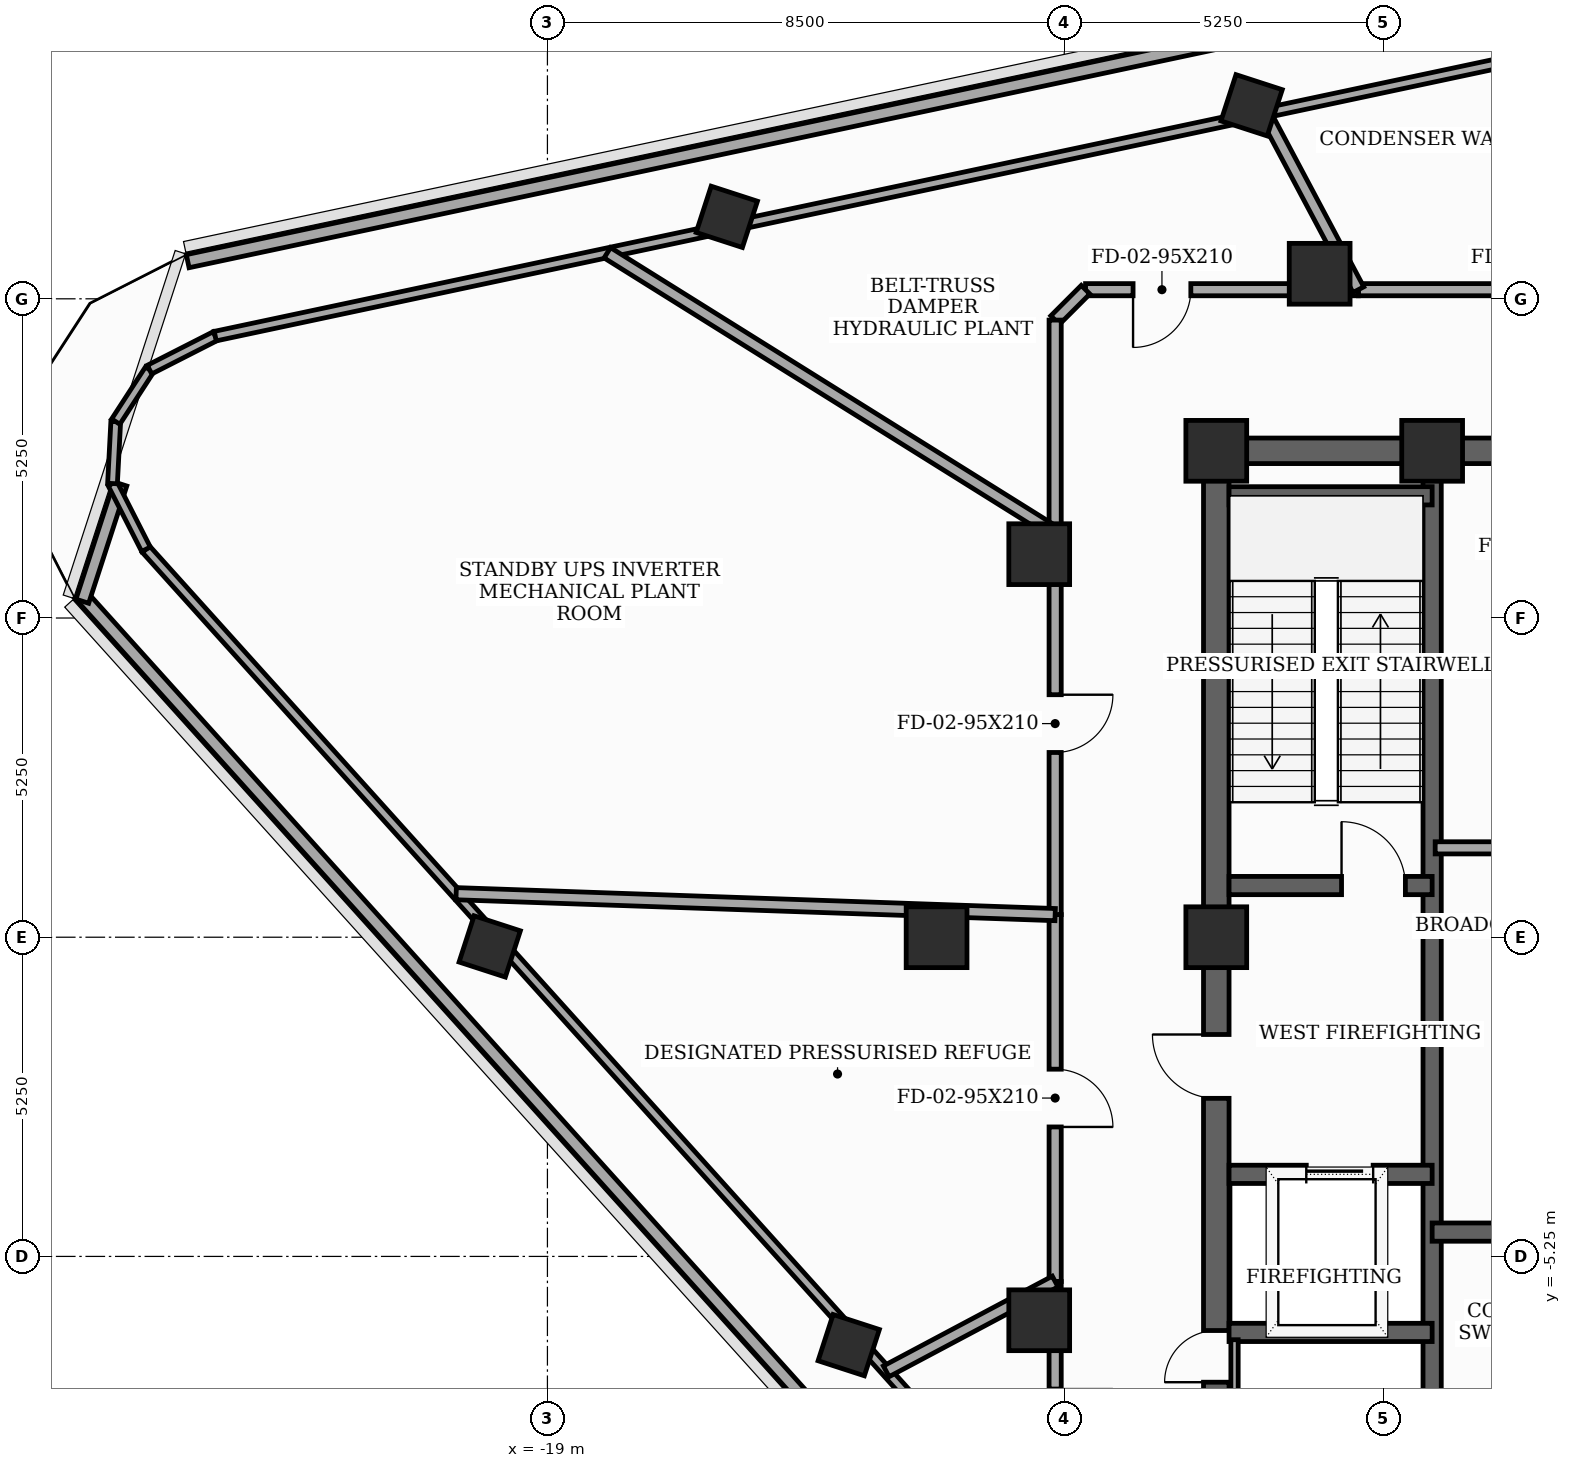
"""IFC4 building model, lengths in metres.
Left out: names, types, materials, properties, quantities, classifications, styles, units other than length and angle.
Written with IfcOpenShell. Run it as: python <this file> out.ifc"""

import sys

from ifc_helpers import new_model, si_unit, direction, frame, frame_2d, origin, origin_2d, place, context, subcontext, project, spatial, rectangle, extrude, element, fill, save


model = new_model("IFC4")
c1 = context("Model", 3, precision=1e-05, world=origin(), true_north=direction((0.0, 1.0)))
c2 = subcontext(c1, "Body", "Model", "MODEL_VIEW")
j1 = project(units=[si_unit("LENGTHUNIT", "METRE"), si_unit("PLANEANGLEUNIT", "RADIAN")], contexts=[c1])
p1 = place(None, origin())
s1 = spatial("IfcSite", under=j1, at=p1, CompositionType="ELEMENT")
p2 = place(p1, origin())
s2 = spatial("IfcBuilding", under=s1, at=p2, CompositionType="ELEMENT")
p3 = place(p2, frame((0.0, 0.0, 278.1)))
s3 = spatial("IfcBuildingStorey", under=s2, at=p3, CompositionType="ELEMENT", Elevation=278.1)
for number, where, z_axis, x_axis in (
    (1, (-4.45, 8.0, 0.0), (0.0, 0.0, 1.0), (1.0, 0.0, 0.0)),
    (2, (-8.0, 8.0, 0.0), (0.0, 0.0, 1.0), (1.0, 0.0, 0.0)),
    (3, (-8.0, 0.0, 0.0), (0.0, 0.0, 1.0), (1.0, 0.0, 0.0)),
    (4, (-6.3, 10.912, 0.0), (0.0, 0.0, 1.0), (1.0, 0.0, 0.0)),
    (5, (-10.912, 6.3, 0.0), (0.0, 0.0, 1.0), (1.0, 0.0, 0.0)),
    (6, (-12.6, 0.0, 0.0), (0.0, 0.0, 1.0), (1.0, 0.0, 0.0)),
    (7, (-10.912, -6.3, 0.0), (0.0, 0.0, 1.0), (1.0, 0.0, 0.0)),
):
    element("IfcColumn", number, at=place(p3, frame(where, z_axis=z_axis, x_axis=x_axis)), inside=s3, PredefinedType="COLUMN", context=c2, shape_type="SweptSolid", body=[
        extrude(rectangle(XDim=1.0, YDim=1.0, at=origin_2d()), origin(), (0.0, 0.0, 1.0), 5.1),
    ])
for number, where, z_axis, x_axis in (
    (8, (-7.419, 13.683, 0.0), (0.0, 0.0, 1.0), (0.309, 0.951, 0.0)),
    (9, (-16.05, 11.848, 0.0), (0.0, 0.0, 1.0), (0.309, 0.951, 0.0)),
    (10, (-19.949, -0.151, 0.0), (0.0, 0.0, 1.0), (0.309, 0.951, 0.0)),
    (11, (-14.045, -6.709, 0.0), (0.0, 0.0, 1.0), (0.309, 0.951, 0.0)),
):
    element("IfcColumn", number, at=place(p3, frame(where, z_axis=z_axis, x_axis=x_axis)), inside=s3, PredefinedType="COLUMN", context=c2, shape_type="SweptSolid", body=[
        extrude(rectangle(XDim=0.8, YDim=0.8, at=origin_2d()), origin(), (0.0, 0.0, 1.0), 5.1),
    ])
p4 = place(p3, frame((18.24, 20.292, 0.0), z_axis=(0.0, 0.0, 1.0), x_axis=(-0.978147584683, -0.207911766332, 0.0)))
e12 = element("IfcWall", 12, at=p4, inside=s3, PredefinedType="SOLIDWALL", context=c2, shape_type="SweptSolid", body=[
    extrude(rectangle(XDim=44.12, YDim=0.22, at=frame_2d((22.06, 0.0))), origin(), (0.0, 0.0, 1.0), 4.4),
])
p5 = place(p3, frame((-26.693, 5.65, 0.0), z_axis=(0.0, 0.0, 1.0), x_axis=(0.669131945078, -0.743143620087, 0.0)))
e13 = element("IfcWall", 13, at=p5, inside=s3, PredefinedType="SOLIDWALL", context=c2, shape_type="SweptSolid", body=[
    extrude(rectangle(XDim=44.12, YDim=0.22, at=frame_2d((22.06, 0.0))), origin(), (0.0, 0.0, 1.0), 4.4),
])
p6 = place(p3, frame((-26.022, 7.455, 0.0), z_axis=(0.0, 0.0, 1.0), x_axis=(-0.309031629186, -0.951051761032, 0.0)))
e14 = element("IfcWall", 14, at=p6, inside=s3, PredefinedType="SOLIDWALL", context=c2, shape_type="SweptSolid", body=[
    extrude(rectangle(XDim=2.028, YDim=0.22, at=frame_2d((1.014, 0.0))), origin(), (0.0, 0.0, 1.0), 4.4),
])
p7 = place(p3, frame((-8.0, -8.0, 0.0), z_axis=(0.0, 0.0, 1.0), x_axis=(0.0, 1.0, 0.0)))
e15 = element("IfcWall", 15, at=p7, inside=s3, PredefinedType="SHEAR", context=c2, shape_type="SweptSolid", body=[
    extrude(rectangle(XDim=16.0, YDim=0.42, at=frame_2d((8.0, 0.0))), origin(), (0.0, 0.0, 1.0), 4.9),
])
p8 = place(p7, frame((0.681, 0.0, 0.0)))
e16 = element("IfcOpeningElement", 16, at=p8, cuts=e15, PredefinedType="OPENING", context=c2, shape_type="SweptSolid", body=[
    extrude(rectangle(XDim=0.85, YDim=2.02, at=frame_2d((0.425, 1.01))), frame((0.0, 0.22, 0.0), z_axis=(0.0, -1.0, 0.0), x_axis=(1.0, 0.0, 0.0)), (0.0, 0.0, 1.0), 0.44),
])
p9 = place(p7, frame((5.35, 0.0, 0.0)))
e17 = element("IfcOpeningElement", 17, at=p9, cuts=e15, PredefinedType="OPENING", context=c2, shape_type="SweptSolid", body=[
    extrude(rectangle(XDim=1.05, YDim=2.15, at=frame_2d((0.525, 1.075))), frame((0.0, 0.22, 0.0), z_axis=(0.0, -1.0, 0.0), x_axis=(1.0, 0.0, 0.0)), (0.0, 0.0, 1.0), 0.44),
])
p10 = place(p3, frame((-8.0, 8.0, 0.0), z_axis=(0.0, 0.0, 1.0), x_axis=(1.0, 0.0, 0.0)))
e18 = element("IfcWall", 18, at=p10, inside=s3, PredefinedType="SHEAR", context=c2, shape_type="SweptSolid", body=[
    extrude(rectangle(XDim=16.0, YDim=0.42, at=frame_2d((8.0, 0.0))), origin(), (0.0, 0.0, 1.0), 4.9),
])
p11 = place(p10, frame((7.1, 0.0, 0.0)))
e19 = element("IfcOpeningElement", 19, at=p11, cuts=e18, PredefinedType="OPENING", context=c2, shape_type="SweptSolid", body=[
    extrude(rectangle(XDim=1.8, YDim=2.15, at=frame_2d((0.9, 1.075))), frame((0.0, 0.22, 0.0), z_axis=(0.0, -1.0, 0.0), x_axis=(1.0, 0.0, 0.0)), (0.0, 0.0, 1.0), 0.44),
])
p12 = place(p3, frame((-4.45, -7.79, 0.0), z_axis=(0.0, 0.0, 1.0), x_axis=(0.0, 1.0, 0.0)))
e20 = element("IfcWall", 20, at=p12, inside=s3, PredefinedType="SHEAR", context=c2, shape_type="SweptSolid", body=[
    extrude(rectangle(XDim=15.58, YDim=0.3, at=frame_2d((7.79, 0.0))), origin(), (0.0, 0.0, 1.0), 4.9),
])
p13 = place(p3, frame((-7.79, 0.85, 0.0), z_axis=(0.0, 0.0, 1.0), x_axis=(1.0, 0.0, 0.0)))
e21 = element("IfcWall", 21, at=p13, inside=s3, PredefinedType="SHEAR", context=c2, shape_type="SweptSolid", body=[
    extrude(rectangle(XDim=3.34, YDim=0.3, at=frame_2d((1.67, 0.0))), origin(), (0.0, 0.0, 1.0), 4.9),
])
p14 = place(p13, frame((1.85, 0.0, 0.0)))
e22 = element("IfcOpeningElement", 22, at=p14, cuts=e21, PredefinedType="OPENING", context=c2, shape_type="SweptSolid", body=[
    extrude(rectangle(XDim=1.05, YDim=2.15, at=frame_2d((0.525, 1.075))), frame((0.0, 0.16, 0.0), z_axis=(0.0, -1.0, 0.0), x_axis=(1.0, 0.0, 0.0)), (0.0, 0.0, 1.0), 0.32),
])
p15 = place(p3, frame((-7.79, 7.26, 0.0), z_axis=(0.0, 0.0, 1.0), x_axis=(1.0, 0.0, 0.0)))
e23 = element("IfcWall", 23, at=p15, inside=s3, PredefinedType="SHEAR", context=c2, shape_type="SweptSolid", body=[
    extrude(rectangle(XDim=3.34, YDim=0.3, at=frame_2d((1.67, 0.0))), origin(), (0.0, 0.0, 1.0), 4.9),
])
p16 = place(p3, frame((-7.79, -3.9, 0.0), z_axis=(0.0, 0.0, 1.0), x_axis=(1.0, 0.0, 0.0)))
e24 = element("IfcWall", 24, at=p16, inside=s3, PredefinedType="SHEAR", context=c2, shape_type="SweptSolid", body=[
    extrude(rectangle(XDim=3.34, YDim=0.3, at=frame_2d((1.67, 0.0))), origin(), (0.0, 0.0, 1.0), 4.9),
])
p17 = place(p16, frame((1.27, 0.0, 0.0)))
e25 = element("IfcOpeningElement", 25, at=p17, cuts=e24, PredefinedType="OPENING", context=c2, shape_type="SweptSolid", body=[
    extrude(rectangle(XDim=1.1, YDim=2.1, at=frame_2d((0.55, 1.05))), frame((0.0, 0.16, 0.0), z_axis=(0.0, -1.0, 0.0), x_axis=(1.0, 0.0, 0.0)), (0.0, 0.0, 1.0), 0.32),
])
p18 = place(p3, frame((-7.79, -6.5, 0.0), z_axis=(0.0, 0.0, 1.0), x_axis=(1.0, 0.0, 0.0)))
e26 = element("IfcWall", 26, at=p18, inside=s3, PredefinedType="SHEAR", context=c2, shape_type="SweptSolid", body=[
    extrude(rectangle(XDim=3.34, YDim=0.3, at=frame_2d((1.67, 0.0))), origin(), (0.0, 0.0, 1.0), 4.9),
])
p19 = place(p3, frame((-4.45, -4.85, 0.0), z_axis=(0.0, 0.0, 1.0), x_axis=(1.0, 0.0, 0.0)))
e27 = element("IfcWall", 27, at=p19, inside=s3, PredefinedType="SHEAR", context=c2, shape_type="SweptSolid", body=[
    extrude(rectangle(XDim=8.9, YDim=0.3, at=frame_2d((4.45, 0.0))), origin(), (0.0, 0.0, 1.0), 4.9),
])
p20 = place(p3, frame((-4.4, 1.47, 0.0), z_axis=(0.0, 0.0, 1.0), x_axis=(1.0, 0.0, 0.0)))
e28 = element("IfcWall", 28, at=p20, inside=s3, PredefinedType="SOLIDWALL", context=c2, shape_type="SweptSolid", body=[
    extrude(rectangle(XDim=2.68, YDim=0.2, at=frame_2d((1.34, 0.0))), origin(), (0.0, 0.0, 1.0), 4.9),
])
p21 = place(p3, frame((3.67, -26.129, 0.0), z_axis=(0.0, 0.0, 1.0), x_axis=(-0.669133990093, 0.743141778735, 0.0)))
e29 = element("IfcWall", 29, at=p21, inside=s3, PredefinedType="SOLIDWALL", context=c2, shape_type="SweptSolid", body=[
    extrude(rectangle(XDim=43.746, YDim=0.16, at=frame_2d((21.873, 0.0))), origin(), (0.0, 0.0, 1.0), 3.485),
])
p22 = place(p3, frame((-25.602, 6.381, 0.0), z_axis=(0.0, 0.0, 1.0), x_axis=(-0.453961953638, 0.891021068577, 0.0)))
e30 = element("IfcWall", 30, at=p22, inside=s3, PredefinedType="SOLIDWALL", context=c2, shape_type="SweptSolid", body=[
    extrude(rectangle(XDim=1.213, YDim=0.16, at=frame_2d((0.607, 0.0))), origin(), (0.0, 0.0, 1.0), 4.9),
])
p23 = place(p3, frame((-26.153, 7.462, 0.0), z_axis=(0.0, 0.0, 1.0), x_axis=(0.052433169821, 0.998624435262, 0.0)))
e31 = element("IfcWall", 31, at=p23, inside=s3, PredefinedType="SOLIDWALL", context=c2, shape_type="SweptSolid", body=[
    extrude(rectangle(XDim=1.02, YDim=0.16, at=frame_2d((0.51, 0.0))), origin(), (0.0, 0.0, 1.0), 4.9),
])
p24 = place(p3, frame((-26.099, 8.48, 0.0), z_axis=(0.0, 0.0, 1.0), x_axis=(0.544491696381, 0.838766232375, 0.0)))
e32 = element("IfcWall", 32, at=p24, inside=s3, PredefinedType="SOLIDWALL", context=c2, shape_type="SweptSolid", body=[
    extrude(rectangle(XDim=1.02, YDim=0.16, at=frame_2d((0.51, 0.0))), origin(), (0.0, 0.0, 1.0), 4.9),
])
p25 = place(p3, frame((-25.544, 9.335, 0.0), z_axis=(0.0, 0.0, 1.0), x_axis=(0.891021068577, 0.453961953638, 0.0)))
e33 = element("IfcWall", 33, at=p25, inside=s3, PredefinedType="SOLIDWALL", context=c2, shape_type="SweptSolid", body=[
    extrude(rectangle(XDim=1.213, YDim=0.16, at=frame_2d((0.607, 0.0))), origin(), (0.0, 0.0, 1.0), 4.9),
])
p26 = place(p3, frame((-24.463, 9.886, 0.0), z_axis=(0.0, 0.0, 1.0), x_axis=(0.978148254478, 0.20790861517, 0.0)))
e34 = element("IfcWall", 34, at=p26, inside=s3, PredefinedType="SOLIDWALL", context=c2, shape_type="SweptSolid", body=[
    extrude(rectangle(XDim=43.746, YDim=0.16, at=frame_2d((21.873, 0.0))), origin(), (0.0, 0.0, 1.0), 3.485),
])
p27 = place(p3, frame((-10.65, 0.372, 0.0), z_axis=(0.0, 0.0, 1.0), x_axis=(0.0, -1.0, 0.0)))
e35 = element("IfcWall", 35, at=p27, inside=s3, PredefinedType="SOLIDWALL", context=c2, shape_type="SweptSolid", body=[
    extrude(rectangle(XDim=6.035, YDim=0.2, at=frame_2d((3.018, 0.0))), origin(), (0.0, 0.0, 1.0), 4.285),
])
p28 = place(p27, frame((2.542, 0.0, 0.0)))
e36 = element("IfcOpeningElement", 36, at=p28, cuts=e35, PredefinedType="OPENING", context=c2, shape_type="SweptSolid", body=[
    extrude(rectangle(XDim=0.95, YDim=2.1, at=frame_2d((0.475, 1.05))), frame((0.0, 0.11, 0.0), z_axis=(0.0, -1.0, 0.0), x_axis=(1.0, 0.0, 0.0)), (0.0, 0.0, 1.0), 0.22),
])
p29 = place(p3, frame((-10.65, -5.663, 0.0), z_axis=(0.0, 0.0, 1.0), x_axis=(0.0, -1.0, 0.0)))
e37 = element("IfcWall", 37, at=p29, inside=s3, PredefinedType="SOLIDWALL", context=c2, shape_type="SweptSolid", body=[
    extrude(rectangle(XDim=4.487, YDim=0.2, at=frame_2d((2.243, 0.0))), origin(), (0.0, 0.0, 1.0), 3.485),
])
p30 = place(p29, frame((1.769, 0.0, 0.0)))
e38 = element("IfcOpeningElement", 38, at=p30, cuts=e37, PredefinedType="OPENING", context=c2, shape_type="SweptSolid", body=[
    extrude(rectangle(XDim=0.95, YDim=2.1, at=frame_2d((0.475, 1.05))), frame((0.0, 0.11, 0.0), z_axis=(0.0, -1.0, 0.0), x_axis=(1.0, 0.0, 0.0)), (0.0, 0.0, 1.0), 0.22),
])
p31 = place(p3, frame((0.372, 10.65, 0.0), z_axis=(0.0, 0.0, 1.0), x_axis=(-1.0, 0.0, 0.0)))
e39 = element("IfcWall", 39, at=p31, inside=s3, PredefinedType="SOLIDWALL", context=c2, shape_type="SweptSolid", body=[
    extrude(rectangle(XDim=6.035, YDim=0.2, at=frame_2d((3.018, 0.0))), origin(), (0.0, 0.0, 1.0), 4.9),
])
p32 = place(p31, frame((2.542, 0.0, 0.0)))
e40 = element("IfcOpeningElement", 40, at=p32, cuts=e39, PredefinedType="OPENING", context=c2, shape_type="SweptSolid", body=[
    extrude(rectangle(XDim=0.95, YDim=2.1, at=frame_2d((0.475, 1.05))), frame((0.0, 0.11, 0.0), z_axis=(0.0, -1.0, 0.0), x_axis=(1.0, 0.0, 0.0)), (0.0, 0.0, 1.0), 0.22),
])
p33 = place(p3, frame((-5.663, 10.65, 0.0), z_axis=(0.0, 0.0, 1.0), x_axis=(-1.0, 0.0, 0.0)))
e41 = element("IfcWall", 41, at=p33, inside=s3, PredefinedType="SOLIDWALL", context=c2, shape_type="SweptSolid", body=[
    extrude(rectangle(XDim=4.487, YDim=0.2, at=frame_2d((2.243, 0.0))), origin(), (0.0, 0.0, 1.0), 4.285),
])
p34 = place(p33, frame((2.756, 0.0, 0.0)))
e42 = element("IfcOpeningElement", 42, at=p34, cuts=e41, PredefinedType="OPENING", context=c2, shape_type="SweptSolid", body=[
    extrude(rectangle(XDim=0.95, YDim=2.1, at=frame_2d((0.475, 1.05))), frame((0.0, 0.11, 0.0), z_axis=(0.0, -1.0, 0.0), x_axis=(1.0, 0.0, 0.0)), (0.0, 0.0, 1.0), 0.22),
])
p35 = place(p3, frame((-10.15, 10.65, 0.0), z_axis=(0.0, 0.0, 1.0), x_axis=(-0.707106781187, -0.707106781187, 0.0)))
e43 = element("IfcWall", 43, at=p35, inside=s3, PredefinedType="SOLIDWALL", context=c2, shape_type="SweptSolid", body=[
    extrude(rectangle(XDim=0.707, YDim=0.2, at=frame_2d((0.354, 0.0))), origin(), (0.0, 0.0, 1.0), 4.9),
])
p36 = place(p3, frame((-10.65, 10.15, 0.0), z_axis=(0.0, 0.0, 1.0), x_axis=(0.0, -1.0, 0.0)))
e44 = element("IfcWall", 44, at=p36, inside=s3, PredefinedType="SOLIDWALL", context=c2, shape_type="SweptSolid", body=[
    extrude(rectangle(XDim=3.495, YDim=0.2, at=frame_2d((1.748, 0.0))), origin(), (0.0, 0.0, 1.0), 4.285),
])
p37 = place(p3, frame((-10.65, 6.655, 0.0), z_axis=(0.0, 0.0, 1.0), x_axis=(0.0, -1.0, 0.0)))
e45 = element("IfcWall", 45, at=p37, inside=s3, PredefinedType="SOLIDWALL", context=c2, shape_type="SweptSolid", body=[
    extrude(rectangle(XDim=6.283, YDim=0.2, at=frame_2d((3.142, 0.0))), origin(), (0.0, 0.0, 1.0), 3.485),
])
p38 = place(p37, frame((2.667, 0.0, 0.0)))
e46 = element("IfcOpeningElement", 46, at=p38, cuts=e45, PredefinedType="OPENING", context=c2, shape_type="SweptSolid", body=[
    extrude(rectangle(XDim=0.95, YDim=2.1, at=frame_2d((0.475, 1.05))), frame((0.0, 0.11, 0.0), z_axis=(0.0, -1.0, 0.0), x_axis=(1.0, 0.0, 0.0)), (0.0, 0.0, 1.0), 0.22),
])
p39 = place(p3, frame((-13.428, -7.14, 0.0), z_axis=(0.0, 0.0, 1.0), x_axis=(0.882990100453, 0.469391608897, 0.0)))
e47 = element("IfcWall", 47, at=p39, inside=s3, PredefinedType="SOLIDWALL", context=c2, shape_type="SweptSolid", body=[
    extrude(rectangle(XDim=3.146, YDim=0.2, at=frame_2d((1.573, 0.0))), origin(), (0.0, 0.0, 1.0), 3.485),
])
p40 = place(p3, frame((-10.65, 0.372, 0.0), z_axis=(0.0, 0.0, 1.0), x_axis=(-0.999390903009, 0.03489732057, 0.0)))
e48 = element("IfcWall", 48, at=p40, inside=s3, PredefinedType="SOLIDWALL", context=c2, shape_type="SweptSolid", body=[
    extrude(rectangle(XDim=9.857, YDim=0.2, at=frame_2d((4.929, 0.0))), origin(), (0.0, 0.0, 1.0), 3.485),
])
p41 = place(p3, frame((-7.207, 13.554, 0.0), z_axis=(0.0, 0.0, 1.0), x_axis=(0.469401231217, -0.882984985224, 0.0)))
e49 = element("IfcWall", 49, at=p41, inside=s3, PredefinedType="SOLIDWALL", context=c2, shape_type="SweptSolid", body=[
    extrude(rectangle(XDim=3.289, YDim=0.2, at=frame_2d((1.645, 0.0))), origin(), (0.0, 0.0, 1.0), 3.485),
])
p42 = place(p3, frame((-18.015, 11.257, 0.0), z_axis=(0.0, 0.0, 1.0), x_axis=(0.848053575724, -0.529910494991, 0.0)))
e50 = element("IfcWall", 50, at=p42, inside=s3, PredefinedType="SOLIDWALL", context=c2, shape_type="SweptSolid", body=[
    extrude(rectangle(XDim=8.685, YDim=0.2, at=frame_2d((4.342, 0.0))), origin(), (0.0, 0.0, 1.0), 3.485),
])
p43 = place(p3, frame((-7.7, -7.75, 0.0), z_axis=(0.0, 0.0, 1.0), x_axis=(0.0, 1.0, 0.0)))
e51 = element("IfcWall", 51, at=p43, inside=s3, PredefinedType="PLUMBINGWALL", context=c2, shape_type="SweptSolid", body=[
    extrude(rectangle(XDim=1.13, YDim=0.12, at=frame_2d((0.565, 0.0))), origin(), (0.0, 0.0, 1.0), 4.9),
])
p44 = place(p8, origin())
e52 = element("IfcDoor", 52, at=p44, inside=s3, OperationType="SINGLE_SWING_LEFT", PredefinedType="TRAPDOOR", context=c2, shape_type="SweptSolid", body=[
    extrude(rectangle(XDim=0.85, YDim=2.02, at=frame_2d((0.425, 1.01))), frame((0.0, 0.025, 0.0), z_axis=(0.0, -1.0, 0.0), x_axis=(1.0, 0.0, 0.0)), (0.0, 0.0, 1.0), 0.05),
])
fill(e16, e52)
p45 = place(p9, origin())
e53 = element("IfcDoor", 53, at=p45, inside=s3, OperationType="SINGLE_SWING_RIGHT", PredefinedType="DOOR", context=c2, shape_type="SweptSolid", body=[
    extrude(rectangle(XDim=1.05, YDim=2.15, at=frame_2d((0.525, 1.075))), frame((0.0, 0.025, 0.0), z_axis=(0.0, -1.0, 0.0), x_axis=(1.0, 0.0, 0.0)), (0.0, 0.0, 1.0), 0.05),
])
fill(e17, e53)
p46 = place(p14, origin())
e54 = element("IfcDoor", 54, at=p46, inside=s3, OperationType="SINGLE_SWING_LEFT", PredefinedType="DOOR", context=c2, shape_type="SweptSolid", body=[
    extrude(rectangle(XDim=1.05, YDim=2.15, at=frame_2d((0.525, 1.075))), frame((0.0, 0.025, 0.0), z_axis=(0.0, -1.0, 0.0), x_axis=(1.0, 0.0, 0.0)), (0.0, 0.0, 1.0), 0.05),
])
fill(e22, e54)
p47 = place(p17, origin())
e55 = element("IfcDoor", 55, at=p47, inside=s3, OperationType="SLIDING_TO_LEFT", PredefinedType="DOOR", context=c2, shape_type="SweptSolid", body=[
    extrude(rectangle(XDim=1.1, YDim=2.1, at=frame_2d((0.55, 1.05))), frame((0.0, 0.025, 0.0), z_axis=(0.0, -1.0, 0.0), x_axis=(1.0, 0.0, 0.0)), (0.0, 0.0, 1.0), 0.05),
])
fill(e25, e55)
p48 = place(p28, origin())
e56 = element("IfcDoor", 56, at=p48, inside=s3, OperationType="SINGLE_SWING_RIGHT", PredefinedType="DOOR", context=c2, shape_type="SweptSolid", body=[
    extrude(rectangle(XDim=0.95, YDim=2.1, at=frame_2d((0.475, 1.05))), frame((0.0, 0.025, 0.0), z_axis=(0.0, -1.0, 0.0), x_axis=(1.0, 0.0, 0.0)), (0.0, 0.0, 1.0), 0.05),
])
fill(e36, e56)
p49 = place(p34, origin())
e57 = element("IfcDoor", 57, at=p49, inside=s3, OperationType="SINGLE_SWING_RIGHT", PredefinedType="DOOR", context=c2, shape_type="SweptSolid", body=[
    extrude(rectangle(XDim=0.95, YDim=2.1, at=frame_2d((0.475, 1.05))), frame((0.0, 0.025, 0.0), z_axis=(0.0, -1.0, 0.0), x_axis=(1.0, 0.0, 0.0)), (0.0, 0.0, 1.0), 0.05),
])
fill(e42, e57)
p50 = place(p38, origin())
e58 = element("IfcDoor", 58, at=p50, inside=s3, OperationType="SINGLE_SWING_LEFT", PredefinedType="DOOR", context=c2, shape_type="SweptSolid", body=[
    extrude(rectangle(XDim=0.95, YDim=2.1, at=frame_2d((0.475, 1.05))), frame((0.0, 0.025, 0.0), z_axis=(0.0, -1.0, 0.0), x_axis=(1.0, 0.0, 0.0)), (0.0, 0.0, 1.0), 0.05),
])
fill(e46, e58)
save(model, sys.argv[1])
